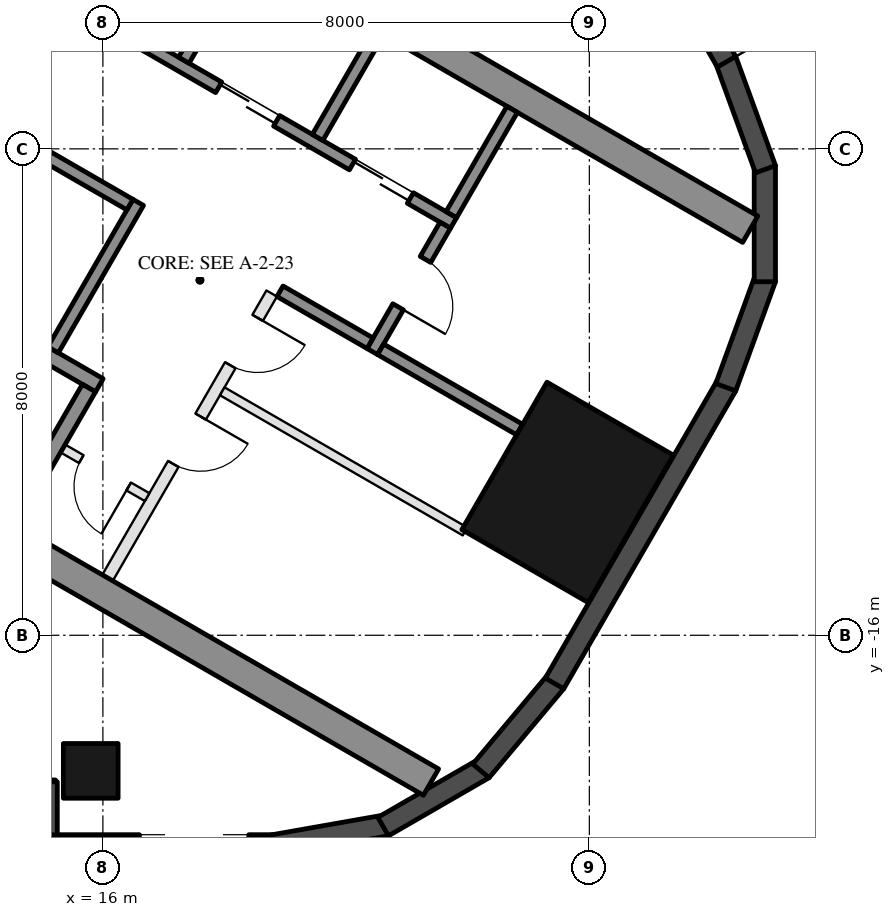
"""IFC4 building model, lengths in metres.
Left out: names, types, materials, properties, quantities, classifications, styles, units other than length and angle.
Written with IfcOpenShell. Run it as: python <this file> out.ifc"""

import sys

from ifc_helpers import new_model, si_unit, direction, frame, frame_2d, origin, origin_2d, place, context, subcontext, project, spatial, rectangle, hollow_rectangle, extrude, element, fill, save


model = new_model("IFC4")
c1 = context("Model", 3, precision=1e-05, world=origin(), true_north=direction((0.0, 1.0)))
c2 = subcontext(c1, "Body", "Model", "MODEL_VIEW")
j1 = project(units=[si_unit("LENGTHUNIT", "METRE"), si_unit("PLANEANGLEUNIT", "RADIAN")], contexts=[c1])
p1 = place(None, origin())
s1 = spatial("IfcSite", under=j1, at=p1, CompositionType="ELEMENT")
p2 = place(p1, origin())
s2 = spatial("IfcBuilding", under=s1, at=p2, CompositionType="ELEMENT")
p3 = place(p2, frame((0.0, 0.0, 105.7)))
s3 = spatial("IfcBuildingStorey", under=s2, at=p3, CompositionType="ELEMENT", Elevation=105.7)
p4 = place(p3, frame((15.8, -18.23, 0.0), z_axis=(0.0, 0.0, 1.0), x_axis=(-1.0, 0.0, 0.0)))
e1 = element("IfcColumn", 1, at=p4, inside=s3, PredefinedType="COLUMN", context=c2, shape_type="SweptSolid", body=[
    extrude(hollow_rectangle(XDim=0.9, YDim=0.9, WallThickness=0.04, at=origin_2d()), origin(), (0.0, 0.0, 1.0), 3.7),
])
p5 = place(p3, frame((23.643, -13.65, 0.0), z_axis=(0.0, 0.0, 1.0), x_axis=(0.5, 0.866025403784, 0.0)))
e2 = element("IfcColumn", 2, at=p5, inside=s3, PredefinedType="COLUMN", context=c2, shape_type="SweptSolid", body=[
    extrude(hollow_rectangle(XDim=2.8, YDim=2.4, WallThickness=0.07, at=origin_2d()), origin(), (0.0, 0.0, 1.0), 3.7),
])
p6 = place(p3, frame((8.48, -18.555, 0.0), z_axis=(0.0, 0.0, 1.0), x_axis=(1.0, 0.0, 0.0)))
e3 = element("IfcWall", 3, at=p6, inside=s3, PredefinedType="SOLIDWALL", context=c2, shape_type="SweptSolid", body=[
    extrude(rectangle(XDim=6.74, YDim=0.35, at=frame_2d((3.37, 0.0))), origin(), (0.0, 0.0, 1.0), 3.55),
])
p7 = place(p6, frame((0.32, 0.0, 0.3)))
e4 = element("IfcOpeningElement", 4, at=p7, cuts=e3, PredefinedType="OPENING", context=c2, shape_type="SweptSolid", body=[
    extrude(rectangle(XDim=2.6, YDim=2.65, at=frame_2d((1.3, 1.325))), frame((0.0, 0.185, 0.0), z_axis=(0.0, -1.0, 0.0), x_axis=(1.0, 0.0, 0.0)), (0.0, 0.0, 1.0), 0.37),
])
p8 = place(p6, frame((3.22, 0.0, 0.3)))
e5 = element("IfcOpeningElement", 5, at=p8, cuts=e3, PredefinedType="OPENING", context=c2, shape_type="SweptSolid", body=[
    extrude(rectangle(XDim=2.6, YDim=2.65, at=frame_2d((1.3, 1.325))), frame((0.0, 0.185, 0.0), z_axis=(0.0, -1.0, 0.0), x_axis=(1.0, 0.0, 0.0)), (0.0, 0.0, 1.0), 0.37),
])
p9 = place(p3, frame((15.075, -18.41, 0.0), z_axis=(0.0, 0.0, 1.0), x_axis=(0.0, -1.0, 0.0)))
e6 = element("IfcWall", 6, at=p9, inside=s3, PredefinedType="SOLIDWALL", context=c2, shape_type="SweptSolid", body=[
    extrude(rectangle(XDim=1.22, YDim=0.35, at=frame_2d((0.61, 0.0))), origin(), (0.0, 0.0, 1.0), 3.55),
])
p10 = place(p3, frame((14.9, -19.455, 0.0), z_axis=(0.0, 0.0, 1.0), x_axis=(1.0, 0.0, 0.0)))
e7 = element("IfcWall", 7, at=p10, inside=s3, PredefinedType="SOLIDWALL", context=c2, shape_type="SweptSolid", body=[
    extrude(rectangle(XDim=3.916, YDim=0.35, at=frame_2d((1.958, 0.0))), origin(), (0.0, 0.0, 1.0), 3.55),
])
p11 = place(p10, frame((1.7, 0.0, 0.3)))
e8 = element("IfcOpeningElement", 8, at=p11, cuts=e7, PredefinedType="OPENING", context=c2, shape_type="SweptSolid", body=[
    extrude(rectangle(XDim=1.8, YDim=2.65, at=frame_2d((0.9, 1.325))), frame((0.0, 0.185, 0.0), z_axis=(0.0, -1.0, 0.0), x_axis=(1.0, 0.0, 0.0)), (0.0, 0.0, 1.0), 0.37),
])
p12 = place(p3, frame((18.785, -19.458, 0.0), z_axis=(0.0, 0.0, 1.0), x_axis=(0.984798995425, 0.173697837091, 0.0)))
e9 = element("IfcWall", 9, at=p12, inside=s3, PredefinedType="SOLIDWALL", context=c2, shape_type="SweptSolid", body=[
    extrude(rectangle(XDim=1.91, YDim=0.35, at=frame_2d((0.955, 0.0))), origin(), (0.0, 0.0, 1.0), 3.55),
])
for number, where, z_axis, x_axis in (
    (10, (20.61, -19.147, 0.0), (0.0, 0.0, 1.0), (0.866, 0.5, 0.0)),
    (11, (22.217, -18.231, 0.0), (0.0, 0.0, 1.0), (0.643, 0.766, 0.0)),
):
    element("IfcWall", number, at=place(p3, frame(where, z_axis=z_axis, x_axis=x_axis)), inside=s3, PredefinedType="SOLIDWALL", context=c2, shape_type="SweptSolid", body=[
        extrude(rectangle(XDim=1.91, YDim=0.35, at=frame_2d((0.955, 0.0))), origin(), (0.0, 0.0, 1.0), 3.55),
    ])
p13 = place(p3, frame((23.427, -16.792, 0.0), z_axis=(0.0, 0.0, 1.0), x_axis=(0.500018773155, 0.866014564827, 0.0)))
e12 = element("IfcWall", 12, at=p13, inside=s3, PredefinedType="SOLIDWALL", context=c2, shape_type="SweptSolid", body=[
    extrude(rectangle(XDim=5.658, YDim=0.35, at=frame_2d((2.829, 0.0))), origin(), (0.0, 0.0, 1.0), 3.55),
])
for number, where, z_axis, x_axis in (
    (13, (26.244, -11.92, 0.0), (0.0, 0.0, 1.0), (0.342, 0.94, 0.0)),
    (14, (26.886, -10.185, 0.0), (0.0, 0.0, 1.0), (0.0, 1.0, 0.0)),
    (15, (26.897, -8.335, 0.0), (0.0, 0.0, 1.0), (-0.342, 0.94, 0.0)),
):
    element("IfcWall", number, at=place(p3, frame(where, z_axis=z_axis, x_axis=x_axis)), inside=s3, PredefinedType="SOLIDWALL", context=c2, shape_type="SweptSolid", body=[
        extrude(rectangle(XDim=1.91, YDim=0.35, at=frame_2d((0.955, 0.0))), origin(), (0.0, 0.0, 1.0), 3.55),
    ])
p14 = place(p3, frame((26.257, -6.567, 0.0), z_axis=(0.0, 0.0, 1.0), x_axis=(-0.500023526245, 0.866011820475, 0.0)))
e16 = element("IfcWall", 16, at=p14, inside=s3, PredefinedType="SOLIDWALL", context=c2, shape_type="SweptSolid", body=[
    extrude(rectangle(XDim=11.816, YDim=0.35, at=frame_2d((5.908, 0.0))), origin(), (0.0, 0.0, 1.0), 3.55),
])
p15 = place(p14, frame((0.38, 0.0, 0.3)))
e17 = element("IfcOpeningElement", 17, at=p15, cuts=e16, PredefinedType="OPENING", context=c2, shape_type="SweptSolid", body=[
    extrude(rectangle(XDim=1.8, YDim=2.65, at=frame_2d((0.9, 1.325))), frame((0.0, 0.185, 0.0), z_axis=(0.0, -1.0, 0.0), x_axis=(1.0, 0.0, 0.0)), (0.0, 0.0, 1.0), 0.37),
])
p16 = place(p14, frame((7.716, 0.0, 0.0)))
e18 = element("IfcOpeningElement", 18, at=p16, cuts=e16, PredefinedType="OPENING", context=c2, shape_type="SweptSolid", body=[
    extrude(rectangle(XDim=2.4, YDim=2.4, at=frame_2d((1.2, 1.2))), frame((0.0, 0.185, 0.0), z_axis=(0.0, -1.0, 0.0), x_axis=(1.0, 0.0, 0.0)), (0.0, 0.0, 1.0), 0.37),
])
p17 = place(p14, frame((3.816, 0.0, 0.3)))
e19 = element("IfcOpeningElement", 19, at=p17, cuts=e16, PredefinedType="OPENING", context=c2, shape_type="SweptSolid", body=[
    extrude(rectangle(XDim=1.6, YDim=2.65, at=frame_2d((0.8, 1.325))), frame((0.0, 0.185, 0.0), z_axis=(0.0, -1.0, 0.0), x_axis=(1.0, 0.0, 0.0)), (0.0, 0.0, 1.0), 0.37),
])
p18 = place(p14, frame((5.716, 0.0, 0.3)))
e20 = element("IfcOpeningElement", 20, at=p18, cuts=e16, PredefinedType="OPENING", context=c2, shape_type="SweptSolid", body=[
    extrude(rectangle(XDim=1.6, YDim=2.65, at=frame_2d((0.8, 1.325))), frame((0.0, 0.185, 0.0), z_axis=(0.0, -1.0, 0.0), x_axis=(1.0, 0.0, 0.0)), (0.0, 0.0, 1.0), 0.37),
])
for number, where, z_axis, x_axis in (
    (21, (8.547, -10.997, 0.0), (0.0, 0.0, 1.0), (0.866, -0.5, 0.0)),
    (22, (13.797, -1.903, 0.0), (0.0, 0.0, 1.0), (0.866, -0.5, 0.0)),
):
    element("IfcWall", number, at=place(p3, frame(where, z_axis=z_axis, x_axis=x_axis)), inside=s3, PredefinedType="SHEAR", context=c2, shape_type="SweptSolid", body=[
        extrude(rectangle(XDim=14.837, YDim=0.5, at=frame_2d((7.418, 0.0))), origin(), (0.0, 0.0, 1.0), 3.5),
    ])
p19 = place(p3, frame((10.356, -8.664, 0.0), z_axis=(0.0, 0.0, 1.0), x_axis=(0.866028629588, -0.499994412703, 0.0)))
e23 = element("IfcWall", 23, at=p19, inside=s3, PredefinedType="SHEAR", context=c2, shape_type="SweptSolid", body=[
    extrude(rectangle(XDim=6.45, YDim=0.25, at=frame_2d((3.225, 0.0))), origin(), (0.0, 0.0, 1.0), 3.5),
])
p20 = place(p19, frame((0.3, 0.0, 0.0)))
e24 = element("IfcOpeningElement", 24, at=p20, cuts=e23, PredefinedType="OPENING", context=c2, shape_type="SweptSolid", body=[
    extrude(rectangle(XDim=1.0, YDim=2.1, at=frame_2d((0.5, 1.05))), frame((0.0, 0.135, 0.0), z_axis=(0.0, -1.0, 0.0), x_axis=(1.0, 0.0, 0.0)), (0.0, 0.0, 1.0), 0.27),
])
p21 = place(p3, frame((14.496, -14.143, 0.0), z_axis=(0.0, 0.0, 1.0), x_axis=(0.500062241894, 0.865989465428, 0.0)))
e25 = element("IfcWall", 25, at=p21, inside=s3, PredefinedType="SHEAR", context=c2, shape_type="SweptSolid", body=[
    extrude(rectangle(XDim=2.55, YDim=0.25, at=frame_2d((1.275, 0.0))), origin(), (0.0, 0.0, 1.0), 3.5),
])
p22 = place(p3, frame((15.181, -11.305, 0.0), z_axis=(0.0, 0.0, 1.0), x_axis=(0.49994636267, 0.866056369097, 0.0)))
e26 = element("IfcWall", 26, at=p22, inside=s3, PredefinedType="SHEAR", context=c2, shape_type="SweptSolid", body=[
    extrude(rectangle(XDim=2.8, YDim=0.2, at=frame_2d((1.4, 0.0))), origin(), (0.0, 0.0, 1.0), 3.5),
])
p23 = place(p3, frame((14.02, -7.517, 0.0), z_axis=(0.0, 0.0, 1.0), x_axis=(0.866034573852, -0.49998411664, 0.0)))
e27 = element("IfcWall", 27, at=p23, inside=s3, PredefinedType="SHEAR", context=c2, shape_type="SweptSolid", body=[
    extrude(rectangle(XDim=2.8, YDim=0.2, at=frame_2d((1.4, 0.0))), origin(), (0.0, 0.0, 1.0), 3.5),
])
p24 = place(p3, frame((12.968, -4.138, 0.0), z_axis=(0.0, 0.0, 1.0), x_axis=(0.866028328073, -0.49999493495, 0.0)))
e28 = element("IfcWall", 28, at=p24, inside=s3, PredefinedType="SHEAR", context=c2, shape_type="SweptSolid", body=[
    extrude(rectangle(XDim=10.16, YDim=0.2, at=frame_2d((5.08, 0.0))), origin(), (0.0, 0.0, 1.0), 3.5),
])
p25 = place(p24, frame((0.62, 0.0, 0.0)))
e29 = element("IfcOpeningElement", 29, at=p25, cuts=e28, PredefinedType="OPENING", context=c2, shape_type="SweptSolid", body=[
    extrude(rectangle(XDim=1.1, YDim=2.1, at=frame_2d((0.55, 1.05))), frame((0.0, 0.11, 0.0), z_axis=(0.0, -1.0, 0.0), x_axis=(1.0, 0.0, 0.0)), (0.0, 0.0, 1.0), 0.22),
])
p26 = place(p24, frame((3.16, 0.0, 0.0)))
e30 = element("IfcOpeningElement", 30, at=p26, cuts=e28, PredefinedType="OPENING", context=c2, shape_type="SweptSolid", body=[
    extrude(rectangle(XDim=1.1, YDim=2.1, at=frame_2d((0.55, 1.05))), frame((0.0, 0.11, 0.0), z_axis=(0.0, -1.0, 0.0), x_axis=(1.0, 0.0, 0.0)), (0.0, 0.0, 1.0), 0.22),
])
p27 = place(p24, frame((5.7, 0.0, 0.0)))
e31 = element("IfcOpeningElement", 31, at=p27, cuts=e28, PredefinedType="OPENING", context=c2, shape_type="SweptSolid", body=[
    extrude(rectangle(XDim=1.1, YDim=2.1, at=frame_2d((0.55, 1.05))), frame((0.0, 0.11, 0.0), z_axis=(0.0, -1.0, 0.0), x_axis=(1.0, 0.0, 0.0)), (0.0, 0.0, 1.0), 0.22),
])
p28 = place(p24, frame((8.24, 0.0, 0.0)))
e32 = element("IfcOpeningElement", 32, at=p28, cuts=e28, PredefinedType="OPENING", context=c2, shape_type="SweptSolid", body=[
    extrude(rectangle(XDim=1.1, YDim=2.1, at=frame_2d((0.55, 1.05))), frame((0.0, 0.11, 0.0), z_axis=(0.0, -1.0, 0.0), x_axis=(1.0, 0.0, 0.0)), (0.0, 0.0, 1.0), 0.22),
])
p29 = place(p3, frame((20.43, -11.333, 0.0), z_axis=(0.0, 0.0, 1.0), x_axis=(0.500001309137, 0.866024647952, 0.0)))
e33 = element("IfcWall", 33, at=p29, inside=s3, PredefinedType="SHEAR", context=c2, shape_type="SweptSolid", body=[
    extrude(rectangle(XDim=2.4, YDim=0.2, at=frame_2d((1.2, 0.0))), origin(), (0.0, 0.0, 1.0), 3.5),
])
p30 = place(p29, frame((0.85, 0.0, 0.0)))
e34 = element("IfcOpeningElement", 34, at=p30, cuts=e33, PredefinedType="OPENING", context=c2, shape_type="SweptSolid", body=[
    extrude(rectangle(XDim=0.9, YDim=2.1, at=frame_2d((0.45, 1.05))), frame((0.0, 0.11, 0.0), z_axis=(0.0, -1.0, 0.0), x_axis=(1.0, 0.0, 0.0)), (0.0, 0.0, 1.0), 0.22),
])
p31 = place(p3, frame((18.913, -10.342, 0.0), z_axis=(0.0, 0.0, 1.0), x_axis=(0.866038183914, -0.499977863513, 0.0)))
e35 = element("IfcWall", 35, at=p31, inside=s3, PredefinedType="SHEAR", context=c2, shape_type="SweptSolid", body=[
    extrude(rectangle(XDim=1.71, YDim=0.2, at=frame_2d((0.855, 0.0))), origin(), (0.0, 0.0, 1.0), 3.5),
])
for number, where, z_axis, x_axis in (
    (36, (17.331, -6.542, 0.0), (0.0, 0.0, 1.0), (0.5, 0.866, 0.0)),
    (37, (19.531, -7.812, 0.0), (0.0, 0.0, 1.0), (0.5, 0.866, 0.0)),
    (38, (21.73, -9.082, 0.0), (0.0, 0.0, 1.0), (0.5, 0.866, 0.0)),
):
    element("IfcWall", number, at=place(p3, frame(where, z_axis=z_axis, x_axis=x_axis)), inside=s3, PredefinedType="SHEAR", context=c2, shape_type="SweptSolid", body=[
        extrude(rectangle(XDim=2.0, YDim=0.2, at=frame_2d((1.0, 0.0))), origin(), (0.0, 0.0, 1.0), 3.5),
    ])
p32 = place(p3, frame((20.567, -11.297, 0.0), z_axis=(0.0, 0.0, 1.0), x_axis=(0.866060851709, -0.499938597367, 0.0)))
e39 = element("IfcWall", 39, at=p32, inside=s3, PredefinedType="SHEAR", context=c2, shape_type="SweptSolid", body=[
    extrude(rectangle(XDim=2.64, YDim=0.2, at=frame_2d((1.32, 0.0))), origin(), (0.0, 0.0, 1.0), 3.5),
])
p33 = place(p3, frame((16.076, -15.055, 0.0), z_axis=(0.0, 0.0, 1.0), x_axis=(0.499995103361, 0.866028230842, 0.0)))
e40 = element("IfcWall", 40, at=p33, inside=s3, PredefinedType="PARTITIONING", context=c2, shape_type="SweptSolid", body=[
    extrude(rectangle(XDim=5.4, YDim=0.2, at=frame_2d((2.7, 0.0))), origin(), (0.0, 0.0, 1.0), 3.5),
])
p34 = place(p33, frame((2.163, 0.0, 0.0)))
e41 = element("IfcOpeningElement", 41, at=p34, cuts=e40, PredefinedType="OPENING", context=c2, shape_type="SweptSolid", body=[
    extrude(rectangle(XDim=0.9, YDim=2.1, at=frame_2d((0.45, 1.05))), frame((0.0, 0.11, 0.0), z_axis=(0.0, -1.0, 0.0), x_axis=(1.0, 0.0, 0.0)), (0.0, 0.0, 1.0), 0.22),
])
p35 = place(p33, frame((4.038, 0.0, 0.0)))
e42 = element("IfcOpeningElement", 42, at=p35, cuts=e40, PredefinedType="OPENING", context=c2, shape_type="SweptSolid", body=[
    extrude(rectangle(XDim=0.9, YDim=2.1, at=frame_2d((0.45, 1.05))), frame((0.0, 0.11, 0.0), z_axis=(0.0, -1.0, 0.0), x_axis=(1.0, 0.0, 0.0)), (0.0, 0.0, 1.0), 0.22),
])
p36 = place(p3, frame((15.342, -12.928, 0.0), z_axis=(0.0, 0.0, 1.0), x_axis=(0.865989903783, -0.500061482766, 0.0)))
e43 = element("IfcWall", 43, at=p36, inside=s3, PredefinedType="PARTITIONING", context=c2, shape_type="SweptSolid", body=[
    extrude(rectangle(XDim=1.6, YDim=0.15, at=frame_2d((0.8, 0.0))), origin(), (0.0, 0.0, 1.0), 3.5),
])
p37 = place(p36, frame((0.35, 0.0, 0.0)))
e44 = element("IfcOpeningElement", 44, at=p37, cuts=e43, PredefinedType="OPENING", context=c2, shape_type="SweptSolid", body=[
    extrude(rectangle(XDim=0.9, YDim=2.1, at=frame_2d((0.45, 1.05))), frame((0.0, 0.085, 0.0), z_axis=(0.0, -1.0, 0.0), x_axis=(1.0, 0.0, 0.0)), (0.0, 0.0, 1.0), 0.17),
])
p38 = place(p3, frame((17.963, -11.987, 0.0), z_axis=(0.0, 0.0, 1.0), x_axis=(0.865998608524, -0.500046407882, 0.0)))
e45 = element("IfcWall", 45, at=p38, inside=s3, PredefinedType="PARTITIONING", context=c2, shape_type="SweptSolid", body=[
    extrude(rectangle(XDim=4.61, YDim=0.15, at=frame_2d((2.305, 0.0))), origin(), (0.0, 0.0, 1.0), 3.5),
])
p39 = place(p37, frame((0.9, 0.0, 0.0), z_axis=(0.0, 0.0, 1.0), x_axis=(-1.0, 0.0, 0.0)))
e46 = element("IfcDoor", 46, at=p39, inside=s3, OperationType="SINGLE_SWING_LEFT", PredefinedType="DOOR", context=c2, shape_type="SweptSolid", body=[
    extrude(rectangle(XDim=0.9, YDim=2.1, at=frame_2d((0.45, 1.05))), frame((0.0, 0.025, 0.0), z_axis=(0.0, -1.0, 0.0), x_axis=(1.0, 0.0, 0.0)), (0.0, 0.0, 1.0), 0.05),
])
fill(e44, e46)
p40 = place(p27, origin())
e47 = element("IfcDoor", 47, at=p40, inside=s3, OperationType="DOUBLE_DOOR_SLIDING", PredefinedType="DOOR", context=c2, shape_type="SweptSolid", body=[
    extrude(rectangle(XDim=1.1, YDim=2.1, at=frame_2d((0.55, 1.05))), frame((0.0, 0.025, 0.0), z_axis=(0.0, -1.0, 0.0), x_axis=(1.0, 0.0, 0.0)), (0.0, 0.0, 1.0), 0.05),
])
fill(e31, e47)
p41 = place(p28, origin())
e48 = element("IfcDoor", 48, at=p41, inside=s3, OperationType="DOUBLE_DOOR_SLIDING", PredefinedType="DOOR", context=c2, shape_type="SweptSolid", body=[
    extrude(rectangle(XDim=1.1, YDim=2.1, at=frame_2d((0.55, 1.05))), frame((0.0, 0.025, 0.0), z_axis=(0.0, -1.0, 0.0), x_axis=(1.0, 0.0, 0.0)), (0.0, 0.0, 1.0), 0.05),
])
fill(e32, e48)
p42 = place(p30, frame((0.9, 0.0, 0.0), z_axis=(0.0, 0.0, 1.0), x_axis=(-1.0, 0.0, 0.0)))
e49 = element("IfcDoor", 49, at=p42, inside=s3, OperationType="SINGLE_SWING_RIGHT", PredefinedType="DOOR", context=c2, shape_type="SweptSolid", body=[
    extrude(rectangle(XDim=0.9, YDim=2.1, at=frame_2d((0.45, 1.05))), frame((0.0, 0.025, 0.0), z_axis=(0.0, -1.0, 0.0), x_axis=(1.0, 0.0, 0.0)), (0.0, 0.0, 1.0), 0.05),
])
fill(e34, e49)
p43 = place(p34, frame((0.9, 0.0, 0.0), z_axis=(0.0, 0.0, 1.0), x_axis=(-1.0, 0.0, 0.0)))
e50 = element("IfcDoor", 50, at=p43, inside=s3, OperationType="SINGLE_SWING_LEFT", PredefinedType="DOOR", context=c2, shape_type="SweptSolid", body=[
    extrude(rectangle(XDim=0.9, YDim=2.1, at=frame_2d((0.45, 1.05))), frame((0.0, 0.025, 0.0), z_axis=(0.0, -1.0, 0.0), x_axis=(1.0, 0.0, 0.0)), (0.0, 0.0, 1.0), 0.05),
])
fill(e41, e50)
p44 = place(p35, frame((0.9, 0.0, 0.0), z_axis=(0.0, 0.0, 1.0), x_axis=(-1.0, 0.0, 0.0)))
e51 = element("IfcDoor", 51, at=p44, inside=s3, OperationType="SINGLE_SWING_LEFT", PredefinedType="DOOR", context=c2, shape_type="SweptSolid", body=[
    extrude(rectangle(XDim=0.9, YDim=2.1, at=frame_2d((0.45, 1.05))), frame((0.0, 0.025, 0.0), z_axis=(0.0, -1.0, 0.0), x_axis=(1.0, 0.0, 0.0)), (0.0, 0.0, 1.0), 0.05),
])
fill(e42, e51)
save(model, sys.argv[1])
